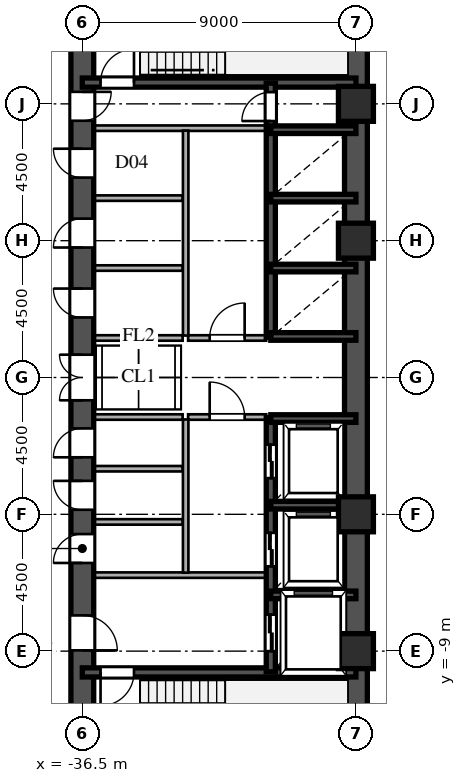
"""IFC4 building model, lengths in metres.
Left out: names, types, materials, properties, quantities, classifications, styles, units other than length and angle.
Written with IfcOpenShell. Run it as: python <this file> out.ifc"""

import sys

from ifc_helpers import new_model, si_unit, direction, frame, frame_2d, origin, origin_2d, place, context, subcontext, project, spatial, rectangle, hollow_rectangle, extrude, source, transform, mapped, element, fill, save


model = new_model("IFC4")
c1 = context("Model", 3, precision=1e-05, world=origin(), true_north=direction((0.0, 1.0)))
c2 = subcontext(c1, "Body", "Model", "MODEL_VIEW")
j1 = project(units=[si_unit("LENGTHUNIT", "METRE"), si_unit("PLANEANGLEUNIT", "RADIAN")], contexts=[c1])
p1 = place(None, origin())
s1 = spatial("IfcSite", under=j1, at=p1, CompositionType="ELEMENT")
p2 = place(p1, origin())
s2 = spatial("IfcBuilding", under=s1, at=p2, CompositionType="ELEMENT")
p3 = place(p2, frame((0.0, 0.0, 58.5)))
s3 = spatial("IfcBuildingStorey", under=s2, at=p3, CompositionType="ELEMENT", Elevation=58.5)
m1 = source(origin(), c2, "Body", "SweptSolid", [
    extrude(hollow_rectangle(XDim=1.15, YDim=1.15, WallThickness=0.048, at=origin_2d()), origin(), (0.0, 0.0, 1.0), 3.6),
])
for number, where, z_axis, x_axis in (
    (1, (-27.5, -9.0, 0.0), (0.0, 0.0, 1.0), (1.0, 0.0, 0.0)),
    (2, (-27.5, -4.5, 0.0), (0.0, 0.0, 1.0), (1.0, 0.0, 0.0)),
    (3, (-27.5, 4.5, 0.0), (0.0, 0.0, 1.0), (1.0, 0.0, 0.0)),
    (4, (-27.5, 9.0, 0.0), (0.0, 0.0, 1.0), (1.0, 0.0, 0.0)),
):
    element("IfcColumn", number, at=place(p3, frame(where, z_axis=z_axis, x_axis=x_axis)), inside=s3, PredefinedType="COLUMN", context=c2, shape_type="MappedRepresentation", body=[
        mapped(m1, transform((0.0, 0.0, 0.0), scale=1.0)),
    ])
for number, where, z_axis, x_axis in (
    (5, (-27.5, -13.5, 0.0), (0.0, 0.0, 1.0), (0.0, 1.0, 0.0)),
    (6, (-27.5, 1.3, 0.0), (0.0, 0.0, 1.0), (0.0, 1.0, 0.0)),
):
    element("IfcWall", number, at=place(p3, frame(where, z_axis=z_axis, x_axis=x_axis)), inside=s3, PredefinedType="SHEAR", context=c2, shape_type="SweptSolid", body=[
        extrude(rectangle(XDim=12.2, YDim=0.75, at=frame_2d((6.1, 0.0))), origin(), (0.0, 0.0, 1.0), 3.38),
    ])
p4 = place(p3, frame((-27.5, -1.3, 0.0), z_axis=(0.0, 0.0, 1.0), x_axis=(0.0, 1.0, 0.0)))
e7 = element("IfcWall", 7, at=p4, inside=s3, PredefinedType="SHEAR", context=c2, shape_type="SweptSolid", body=[
    extrude(rectangle(XDim=2.6, YDim=0.75, at=frame_2d((1.3, 0.0))), origin(), (0.0, 0.0, 1.0), 3.38),
])
p5 = place(p3, frame((-36.5, -13.65, 0.0), z_axis=(0.0, 0.0, 1.0), x_axis=(0.0, 1.0, 0.0)))
e8 = element("IfcWall", 8, at=p5, inside=s3, PredefinedType="SHEAR", context=c2, shape_type="SweptSolid", body=[
    extrude(rectangle(XDim=7.15, YDim=0.75, at=frame_2d((3.575, 0.0))), origin(), (0.0, 0.0, 1.0), 3.38),
])
p6 = place(p5, frame((4.675, 0.0, 0.0)))
e9 = element("IfcOpeningElement", 9, at=p6, cuts=e8, PredefinedType="OPENING", context=c2, shape_type="SweptSolid", body=[
    extrude(rectangle(XDim=1.15, YDim=2.2, at=frame_2d((0.575, 1.1))), frame((0.0, 0.385, 0.0), z_axis=(0.0, -1.0, 0.0), x_axis=(1.0, 0.0, 0.0)), (0.0, 0.0, 1.0), 0.77),
])
p7 = place(p3, frame((-36.5, -1.3, 0.0), z_axis=(0.0, 0.0, 1.0), x_axis=(0.0, 1.0, 0.0)))
e10 = element("IfcWall", 10, at=p7, inside=s3, PredefinedType="SHEAR", context=c2, shape_type="SweptSolid", body=[
    extrude(rectangle(XDim=2.6, YDim=0.75, at=frame_2d((1.3, 0.0))), origin(), (0.0, 0.0, 1.0), 3.38),
])
p8 = place(p7, frame((0.55, 0.0, 0.0)))
e11 = element("IfcOpeningElement", 11, at=p8, cuts=e10, PredefinedType="OPENING", context=c2, shape_type="SweptSolid", body=[
    extrude(rectangle(XDim=1.5, YDim=2.3, at=frame_2d((0.75, 1.15))), frame((0.0, 0.385, 0.0), z_axis=(0.0, -1.0, 0.0), x_axis=(1.0, 0.0, 0.0)), (0.0, 0.0, 1.0), 0.77),
])
p9 = place(p3, frame((-36.5, 8.2, 0.0), z_axis=(0.0, 0.0, 1.0), x_axis=(0.0, 1.0, 0.0)))
e12 = element("IfcWall", 12, at=p9, inside=s3, PredefinedType="SHEAR", context=c2, shape_type="SweptSolid", body=[
    extrude(rectangle(XDim=5.45, YDim=0.75, at=frame_2d((2.725, 0.0))), origin(), (0.0, 0.0, 1.0), 3.38),
])
p10 = place(p9, frame((0.245, 0.0, 0.0)))
e13 = element("IfcOpeningElement", 13, at=p10, cuts=e12, PredefinedType="OPENING", context=c2, shape_type="SweptSolid", body=[
    extrude(rectangle(XDim=0.95, YDim=2.15, at=frame_2d((0.475, 1.075))), frame((0.0, 0.385, 0.0), z_axis=(0.0, -1.0, 0.0), x_axis=(1.0, 0.0, 0.0)), (0.0, 0.0, 1.0), 0.77),
])
p11 = place(p3, frame((-36.5, -6.5, 0.0), z_axis=(0.0, 0.0, 1.0), x_axis=(0.0, 1.0, 0.0)))
e14 = element("IfcWall", 14, at=p11, inside=s3, PredefinedType="SHEAR", context=c2, shape_type="SweptSolid", body=[
    extrude(rectangle(XDim=1.75, YDim=0.75, at=frame_2d((0.875, 0.0))), origin(), (0.0, 0.0, 1.0), 3.38),
])
p12 = place(p11, frame((0.4, 0.0, 0.0)))
e15 = element("IfcOpeningElement", 15, at=p12, cuts=e14, PredefinedType="OPENING", context=c2, shape_type="SweptSolid", body=[
    extrude(rectangle(XDim=0.95, YDim=2.15, at=frame_2d((0.475, 1.075))), frame((0.0, 0.385, 0.0), z_axis=(0.0, -1.0, 0.0), x_axis=(1.0, 0.0, 0.0)), (0.0, 0.0, 1.0), 0.77),
])
p13 = place(p3, frame((-36.5, -4.75, 0.0), z_axis=(0.0, 0.0, 1.0), x_axis=(0.0, 1.0, 0.0)))
e16 = element("IfcWall", 16, at=p13, inside=s3, PredefinedType="SHEAR", context=c2, shape_type="SweptSolid", body=[
    extrude(rectangle(XDim=1.75, YDim=0.75, at=frame_2d((0.875, 0.0))), origin(), (0.0, 0.0, 1.0), 3.38),
])
p14 = place(p13, frame((0.4, 0.0, 0.0)))
e17 = element("IfcOpeningElement", 17, at=p14, cuts=e16, PredefinedType="OPENING", context=c2, shape_type="SweptSolid", body=[
    extrude(rectangle(XDim=0.95, YDim=2.15, at=frame_2d((0.475, 1.075))), frame((0.0, 0.385, 0.0), z_axis=(0.0, -1.0, 0.0), x_axis=(1.0, 0.0, 0.0)), (0.0, 0.0, 1.0), 0.77),
])
p15 = place(p3, frame((-36.5, -3.0, 0.0), z_axis=(0.0, 0.0, 1.0), x_axis=(0.0, 1.0, 0.0)))
e18 = element("IfcWall", 18, at=p15, inside=s3, PredefinedType="SHEAR", context=c2, shape_type="SweptSolid", body=[
    extrude(rectangle(XDim=1.7, YDim=0.75, at=frame_2d((0.85, 0.0))), origin(), (0.0, 0.0, 1.0), 3.38),
])
p16 = place(p15, frame((0.375, 0.0, 0.0)))
e19 = element("IfcOpeningElement", 19, at=p16, cuts=e18, PredefinedType="OPENING", context=c2, shape_type="SweptSolid", body=[
    extrude(rectangle(XDim=0.95, YDim=2.15, at=frame_2d((0.475, 1.075))), frame((0.0, 0.385, 0.0), z_axis=(0.0, -1.0, 0.0), x_axis=(1.0, 0.0, 0.0)), (0.0, 0.0, 1.0), 0.77),
])
p17 = place(p3, frame((-36.5, 1.3, 0.0), z_axis=(0.0, 0.0, 1.0), x_axis=(0.0, 1.0, 0.0)))
e20 = element("IfcWall", 20, at=p17, inside=s3, PredefinedType="SHEAR", context=c2, shape_type="SweptSolid", body=[
    extrude(rectangle(XDim=2.3, YDim=0.75, at=frame_2d((1.15, 0.0))), origin(), (0.0, 0.0, 1.0), 3.38),
])
p18 = place(p17, frame((0.675, 0.0, 0.0)))
e21 = element("IfcOpeningElement", 21, at=p18, cuts=e20, PredefinedType="OPENING", context=c2, shape_type="SweptSolid", body=[
    extrude(rectangle(XDim=0.95, YDim=2.15, at=frame_2d((0.475, 1.075))), frame((0.0, 0.385, 0.0), z_axis=(0.0, -1.0, 0.0), x_axis=(1.0, 0.0, 0.0)), (0.0, 0.0, 1.0), 0.77),
])
p19 = place(p3, frame((-36.5, 3.6, 0.0), z_axis=(0.0, 0.0, 1.0), x_axis=(0.0, 1.0, 0.0)))
e22 = element("IfcWall", 22, at=p19, inside=s3, PredefinedType="SHEAR", context=c2, shape_type="SweptSolid", body=[
    extrude(rectangle(XDim=2.3, YDim=0.75, at=frame_2d((1.15, 0.0))), origin(), (0.0, 0.0, 1.0), 3.38),
])
p20 = place(p19, frame((0.675, 0.0, 0.0)))
e23 = element("IfcOpeningElement", 23, at=p20, cuts=e22, PredefinedType="OPENING", context=c2, shape_type="SweptSolid", body=[
    extrude(rectangle(XDim=0.95, YDim=2.15, at=frame_2d((0.475, 1.075))), frame((0.0, 0.385, 0.0), z_axis=(0.0, -1.0, 0.0), x_axis=(1.0, 0.0, 0.0)), (0.0, 0.0, 1.0), 0.77),
])
p21 = place(p3, frame((-36.5, 5.9, 0.0), z_axis=(0.0, 0.0, 1.0), x_axis=(0.0, 1.0, 0.0)))
e24 = element("IfcWall", 24, at=p21, inside=s3, PredefinedType="SHEAR", context=c2, shape_type="SweptSolid", body=[
    extrude(rectangle(XDim=2.3, YDim=0.75, at=frame_2d((1.15, 0.0))), origin(), (0.0, 0.0, 1.0), 3.38),
])
p22 = place(p21, frame((0.675, 0.0, 0.0)))
e25 = element("IfcOpeningElement", 25, at=p22, cuts=e24, PredefinedType="OPENING", context=c2, shape_type="SweptSolid", body=[
    extrude(rectangle(XDim=0.95, YDim=2.15, at=frame_2d((0.475, 1.075))), frame((0.0, 0.385, 0.0), z_axis=(0.0, -1.0, 0.0), x_axis=(1.0, 0.0, 0.0)), (0.0, 0.0, 1.0), 0.77),
])
p23 = place(p3, frame((-36.5, -9.7, 0.0), z_axis=(0.0, 0.0, 1.0), x_axis=(1.0, 0.0, 0.0)))
e26 = element("IfcWall", 26, at=p23, inside=s3, PredefinedType="SHEAR", context=c2, shape_type="SweptSolid", body=[
    extrude(rectangle(XDim=9.0, YDim=0.3, at=frame_2d((4.5, 0.0))), origin(), (0.0, 0.0, 1.0), 3.38),
])
p24 = place(p23, frame((0.6, 0.0, 0.0)))
e27 = element("IfcOpeningElement", 27, at=p24, cuts=e26, PredefinedType="OPENING", context=c2, shape_type="SweptSolid", body=[
    extrude(rectangle(XDim=1.1, YDim=2.2, at=frame_2d((0.55, 1.1))), frame((0.0, 0.16, 0.0), z_axis=(0.0, -1.0, 0.0), x_axis=(1.0, 0.0, 0.0)), (0.0, 0.0, 1.0), 0.32),
])
p25 = place(p3, frame((-36.5, 9.7, 0.0), z_axis=(0.0, 0.0, 1.0), x_axis=(1.0, 0.0, 0.0)))
e28 = element("IfcWall", 28, at=p25, inside=s3, PredefinedType="SHEAR", context=c2, shape_type="SweptSolid", body=[
    extrude(rectangle(XDim=9.0, YDim=0.3, at=frame_2d((4.5, 0.0))), origin(), (0.0, 0.0, 1.0), 3.38),
])
p26 = place(p25, frame((0.6, 0.0, 0.0)))
e29 = element("IfcOpeningElement", 29, at=p26, cuts=e28, PredefinedType="OPENING", context=c2, shape_type="SweptSolid", body=[
    extrude(rectangle(XDim=1.1, YDim=2.2, at=frame_2d((0.55, 1.1))), frame((0.0, 0.16, 0.0), z_axis=(0.0, -1.0, 0.0), x_axis=(1.0, 0.0, 0.0)), (0.0, 0.0, 1.0), 0.32),
])
for number, where, z_axis, x_axis in (
    (30, (-30.3, -7.15, 0.0), (0.0, 0.0, 1.0), (1.0, 0.0, 0.0)),
    (31, (-30.3, -4.2, 0.0), (0.0, 0.0, 1.0), (1.0, 0.0, 0.0)),
    (32, (-30.3, -1.35, 0.0), (0.0, 0.0, 1.0), (1.0, 0.0, 0.0)),
    (33, (-30.3, 1.35, 0.0), (0.0, 0.0, 1.0), (1.0, 0.0, 0.0)),
    (34, (-30.3, 3.6, 0.0), (0.0, 0.0, 1.0), (1.0, 0.0, 0.0)),
    (35, (-30.3, 5.9, 0.0), (0.0, 0.0, 1.0), (1.0, 0.0, 0.0)),
    (36, (-30.3, 8.15, 0.0), (0.0, 0.0, 1.0), (1.0, 0.0, 0.0)),
):
    element("IfcWall", number, at=place(p3, frame(where, z_axis=z_axis, x_axis=x_axis)), inside=s3, PredefinedType="SHEAR", context=c2, shape_type="SweptSolid", body=[
        extrude(rectangle(XDim=2.8, YDim=0.25, at=frame_2d((1.4, 0.0))), origin(), (0.0, 0.0, 1.0), 3.38),
    ])
p27 = place(p3, frame((-30.3, -9.68, 0.0), z_axis=(0.0, 0.0, 1.0), x_axis=(0.0, 1.0, 0.0)))
e37 = element("IfcWall", 37, at=p27, inside=s3, PredefinedType="SHEAR", context=c2, shape_type="SweptSolid", body=[
    extrude(rectangle(XDim=2.56, YDim=0.3, at=frame_2d((1.28, 0.0))), origin(), (0.0, 0.0, 1.0), 3.38),
])
p28 = place(p27, frame((0.68, 0.0, 0.0)))
e38 = element("IfcOpeningElement", 38, at=p28, cuts=e37, PredefinedType="OPENING", context=c2, shape_type="SweptSolid", body=[
    extrude(rectangle(XDim=1.2, YDim=2.25, at=frame_2d((0.6, 1.125))), frame((0.0, 0.16, 0.0), z_axis=(0.0, -1.0, 0.0), x_axis=(1.0, 0.0, 0.0)), (0.0, 0.0, 1.0), 0.32),
])
p29 = place(p3, frame((-30.3, -7.12, 0.0), z_axis=(0.0, 0.0, 1.0), x_axis=(0.0, 1.0, 0.0)))
e39 = element("IfcWall", 39, at=p29, inside=s3, PredefinedType="SHEAR", context=c2, shape_type="SweptSolid", body=[
    extrude(rectangle(XDim=2.92, YDim=0.3, at=frame_2d((1.46, 0.0))), origin(), (0.0, 0.0, 1.0), 3.38),
])
p30 = place(p29, frame((0.91, 0.0, 0.0)))
e40 = element("IfcOpeningElement", 40, at=p30, cuts=e39, PredefinedType="OPENING", context=c2, shape_type="SweptSolid", body=[
    extrude(rectangle(XDim=1.1, YDim=2.2, at=frame_2d((0.55, 1.1))), frame((0.0, 0.16, 0.0), z_axis=(0.0, -1.0, 0.0), x_axis=(1.0, 0.0, 0.0)), (0.0, 0.0, 1.0), 0.32),
])
p31 = place(p3, frame((-30.3, -4.2, 0.0), z_axis=(0.0, 0.0, 1.0), x_axis=(0.0, 1.0, 0.0)))
e41 = element("IfcWall", 41, at=p31, inside=s3, PredefinedType="SHEAR", context=c2, shape_type="SweptSolid", body=[
    extrude(rectangle(XDim=2.88, YDim=0.3, at=frame_2d((1.44, 0.0))), origin(), (0.0, 0.0, 1.0), 3.38),
])
p32 = place(p31, frame((0.89, 0.0, 0.0)))
e42 = element("IfcOpeningElement", 42, at=p32, cuts=e41, PredefinedType="OPENING", context=c2, shape_type="SweptSolid", body=[
    extrude(rectangle(XDim=1.1, YDim=2.2, at=frame_2d((0.55, 1.1))), frame((0.0, 0.16, 0.0), z_axis=(0.0, -1.0, 0.0), x_axis=(1.0, 0.0, 0.0)), (0.0, 0.0, 1.0), 0.32),
])
p33 = place(p3, frame((-30.3, 1.32, 0.0), z_axis=(0.0, 0.0, 1.0), x_axis=(0.0, 1.0, 0.0)))
e43 = element("IfcWall", 43, at=p33, inside=s3, PredefinedType="SHEAR", context=c2, shape_type="SweptSolid", body=[
    extrude(rectangle(XDim=2.28, YDim=0.3, at=frame_2d((1.14, 0.0))), origin(), (0.0, 0.0, 1.0), 3.38),
])
p34 = place(p3, frame((-30.3, 3.6, 0.0), z_axis=(0.0, 0.0, 1.0), x_axis=(0.0, 1.0, 0.0)))
e44 = element("IfcWall", 44, at=p34, inside=s3, PredefinedType="SHEAR", context=c2, shape_type="SweptSolid", body=[
    extrude(rectangle(XDim=2.3, YDim=0.3, at=frame_2d((1.15, 0.0))), origin(), (0.0, 0.0, 1.0), 3.38),
])
p35 = place(p3, frame((-30.3, 5.9, 0.0), z_axis=(0.0, 0.0, 1.0), x_axis=(0.0, 1.0, 0.0)))
e45 = element("IfcWall", 45, at=p35, inside=s3, PredefinedType="SHEAR", context=c2, shape_type="SweptSolid", body=[
    extrude(rectangle(XDim=2.25, YDim=0.3, at=frame_2d((1.125, 0.0))), origin(), (0.0, 0.0, 1.0), 3.38),
])
p36 = place(p3, frame((-30.3, 8.15, 0.0), z_axis=(0.0, 0.0, 1.0), x_axis=(0.0, 1.0, 0.0)))
e46 = element("IfcWall", 46, at=p36, inside=s3, PredefinedType="SHEAR", context=c2, shape_type="SweptSolid", body=[
    extrude(rectangle(XDim=1.53, YDim=0.3, at=frame_2d((0.765, 0.0))), origin(), (0.0, 0.0, 1.0), 3.38),
])
p37 = place(p36, frame((0.285, 0.0, 0.0)))
e47 = element("IfcOpeningElement", 47, at=p37, cuts=e46, PredefinedType="OPENING", context=c2, shape_type="SweptSolid", body=[
    extrude(rectangle(XDim=0.95, YDim=2.15, at=frame_2d((0.475, 1.075))), frame((0.0, 0.16, 0.0), z_axis=(0.0, -1.0, 0.0), x_axis=(1.0, 0.0, 0.0)), (0.0, 0.0, 1.0), 0.32),
])
for number, where, z_axis, x_axis in (
    (48, (-36.15, -6.5, 0.0), (0.0, 0.0, 1.0), (1.0, 0.0, 0.0)),
    (49, (-36.15, 8.2, 0.0), (0.0, 0.0, 1.0), (1.0, 0.0, 0.0)),
):
    element("IfcWall", number, at=place(p3, frame(where, z_axis=z_axis, x_axis=x_axis)), inside=s3, PredefinedType="PARTITIONING", context=c2, shape_type="SweptSolid", body=[
        extrude(rectangle(XDim=5.7, YDim=0.18, at=frame_2d((2.85, 0.0))), origin(), (0.0, 0.0, 1.0), 3.38),
    ])
p38 = place(p3, frame((-33.1, -6.42, 0.0), z_axis=(0.0, 0.0, 1.0), x_axis=(0.0, 1.0, 0.0)))
e50 = element("IfcWall", 50, at=p38, inside=s3, PredefinedType="PARTITIONING", context=c2, shape_type="SweptSolid", body=[
    extrude(rectangle(XDim=5.04, YDim=0.18, at=frame_2d((2.52, 0.0))), origin(), (0.0, 0.0, 1.0), 3.38),
])
p39 = place(p3, frame((-33.1, 1.38, 0.0), z_axis=(0.0, 0.0, 1.0), x_axis=(0.0, 1.0, 0.0)))
e51 = element("IfcWall", 51, at=p39, inside=s3, PredefinedType="PARTITIONING", context=c2, shape_type="SweptSolid", body=[
    extrude(rectangle(XDim=6.74, YDim=0.18, at=frame_2d((3.37, 0.0))), origin(), (0.0, 0.0, 1.0), 3.38),
])
p40 = place(p3, frame((-33.02, -1.3, 0.0), z_axis=(0.0, 0.0, 1.0), x_axis=(1.0, 0.0, 0.0)))
e52 = element("IfcWall", 52, at=p40, inside=s3, PredefinedType="PARTITIONING", context=c2, shape_type="SweptSolid", body=[
    extrude(rectangle(XDim=2.57, YDim=0.18, at=frame_2d((1.285, 0.0))), origin(), (0.0, 0.0, 1.0), 3.38),
])
p41 = place(p40, frame((0.71, 0.0, 0.0)))
e53 = element("IfcOpeningElement", 53, at=p41, cuts=e52, PredefinedType="OPENING", context=c2, shape_type="SweptSolid", body=[
    extrude(rectangle(XDim=1.15, YDim=2.2, at=frame_2d((0.575, 1.1))), frame((0.0, 0.1, 0.0), z_axis=(0.0, -1.0, 0.0), x_axis=(1.0, 0.0, 0.0)), (0.0, 0.0, 1.0), 0.2),
])
p42 = place(p3, frame((-33.02, 1.3, 0.0), z_axis=(0.0, 0.0, 1.0), x_axis=(1.0, 0.0, 0.0)))
e54 = element("IfcWall", 54, at=p42, inside=s3, PredefinedType="PARTITIONING", context=c2, shape_type="SweptSolid", body=[
    extrude(rectangle(XDim=2.57, YDim=0.18, at=frame_2d((1.285, 0.0))), origin(), (0.0, 0.0, 1.0), 3.38),
])
p43 = place(p42, frame((0.71, 0.0, 0.0)))
e55 = element("IfcOpeningElement", 55, at=p43, cuts=e54, PredefinedType="OPENING", context=c2, shape_type="SweptSolid", body=[
    extrude(rectangle(XDim=1.15, YDim=2.2, at=frame_2d((0.575, 1.1))), frame((0.0, 0.1, 0.0), z_axis=(0.0, -1.0, 0.0), x_axis=(1.0, 0.0, 0.0)), (0.0, 0.0, 1.0), 0.2),
])
for number, where, z_axis, x_axis in (
    (56, (-36.15, -1.3, 0.0), (0.0, 0.0, 1.0), (1.0, 0.0, 0.0)),
    (57, (-36.15, 1.3, 0.0), (0.0, 0.0, 1.0), (1.0, 0.0, 0.0)),
    (58, (-36.15, -4.75, 0.0), (0.0, 0.0, 1.0), (1.0, 0.0, 0.0)),
    (59, (-36.15, -3.0, 0.0), (0.0, 0.0, 1.0), (1.0, 0.0, 0.0)),
    (60, (-36.15, 3.6, 0.0), (0.0, 0.0, 1.0), (1.0, 0.0, 0.0)),
    (61, (-36.15, 5.9, 0.0), (0.0, 0.0, 1.0), (1.0, 0.0, 0.0)),
):
    element("IfcWall", number, at=place(p3, frame(where, z_axis=z_axis, x_axis=x_axis)), inside=s3, PredefinedType="PARTITIONING", context=c2, shape_type="SweptSolid", body=[
        extrude(rectangle(XDim=2.95, YDim=0.18, at=frame_2d((1.475, 0.0))), origin(), (0.0, 0.0, 1.0), 3.38),
    ])
m2 = source(origin(), c2, "Body", "SweptSolid", [
    extrude(rectangle(XDim=1.15, YDim=2.2, at=frame_2d((0.575, 1.1))), frame((0.0, 0.025, 0.0), z_axis=(0.0, -1.0, 0.0), x_axis=(1.0, 0.0, 0.0)), (0.0, 0.0, 1.0), 0.05),
])
p44 = place(p6, frame((1.15, 0.0, 0.0), z_axis=(0.0, 0.0, 1.0), x_axis=(-1.0, 0.0, 0.0)))
e62 = element("IfcDoor", 62, at=p44, inside=s3, OperationType="SINGLE_SWING_LEFT", PredefinedType="DOOR", context=c2, shape_type="MappedRepresentation", body=[
    mapped(m2, transform((0.0, 0.0, 0.0), scale=1.0)),
])
fill(e9, e62)
m3 = source(origin(), c2, "Body", "SweptSolid", [
    extrude(rectangle(XDim=1.5, YDim=2.3, at=frame_2d((0.75, 1.15))), frame((0.0, 0.025, 0.0), z_axis=(0.0, -1.0, 0.0), x_axis=(1.0, 0.0, 0.0)), (0.0, 0.0, 1.0), 0.05),
])
p45 = place(p8, origin())
e63 = element("IfcDoor", 63, at=p45, inside=s3, OperationType="DOUBLE_SWING_LEFT", PredefinedType="DOOR", context=c2, shape_type="MappedRepresentation", body=[
    mapped(m3, transform((0.0, 0.0, 0.0), scale=1.0)),
])
fill(e11, e63)
m4 = source(origin(), c2, "Body", "SweptSolid", [
    extrude(rectangle(XDim=0.95, YDim=2.15, at=frame_2d((0.475, 1.075))), frame((0.0, 0.025, 0.0), z_axis=(0.0, -1.0, 0.0), x_axis=(1.0, 0.0, 0.0)), (0.0, 0.0, 1.0), 0.05),
])
p46 = place(p10, frame((0.95, 0.0, 0.0), z_axis=(0.0, 0.0, 1.0), x_axis=(-1.0, 0.0, 0.0)))
e64 = element("IfcDoor", 64, at=p46, inside=s3, OperationType="SINGLE_SWING_RIGHT", PredefinedType="DOOR", context=c2, shape_type="MappedRepresentation", body=[
    mapped(m4, transform((0.0, 0.0, 0.0), scale=1.0)),
])
fill(e13, e64)
p47 = place(p12, origin())
e65 = element("IfcDoor", 65, at=p47, inside=s3, OperationType="SINGLE_SWING_LEFT", PredefinedType="DOOR", context=c2, shape_type="MappedRepresentation", body=[
    mapped(m4, transform((0.0, 0.0, 0.0), scale=1.0)),
])
fill(e15, e65)
p48 = place(p14, origin())
e66 = element("IfcDoor", 66, at=p48, inside=s3, OperationType="SINGLE_SWING_RIGHT", PredefinedType="DOOR", context=c2, shape_type="MappedRepresentation", body=[
    mapped(m4, transform((0.0, 0.0, 0.0), scale=1.0)),
])
fill(e17, e66)
p49 = place(p16, origin())
e67 = element("IfcDoor", 67, at=p49, inside=s3, OperationType="SINGLE_SWING_LEFT", PredefinedType="DOOR", context=c2, shape_type="MappedRepresentation", body=[
    mapped(m4, transform((0.0, 0.0, 0.0), scale=1.0)),
])
fill(e19, e67)
p50 = place(p18, origin())
e68 = element("IfcDoor", 68, at=p50, inside=s3, OperationType="SINGLE_SWING_RIGHT", PredefinedType="DOOR", context=c2, shape_type="MappedRepresentation", body=[
    mapped(m4, transform((0.0, 0.0, 0.0), scale=1.0)),
])
fill(e21, e68)
p51 = place(p20, origin())
e69 = element("IfcDoor", 69, at=p51, inside=s3, OperationType="SINGLE_SWING_LEFT", PredefinedType="DOOR", context=c2, shape_type="MappedRepresentation", body=[
    mapped(m4, transform((0.0, 0.0, 0.0), scale=1.0)),
])
fill(e23, e69)
p52 = place(p22, origin())
e70 = element("IfcDoor", 70, at=p52, inside=s3, OperationType="SINGLE_SWING_RIGHT", PredefinedType="DOOR", context=c2, shape_type="MappedRepresentation", body=[
    mapped(m4, transform((0.0, 0.0, 0.0), scale=1.0)),
])
fill(e25, e70)
m5 = source(origin(), c2, "Body", "SweptSolid", [
    extrude(rectangle(XDim=1.1, YDim=2.2, at=frame_2d((0.55, 1.1))), frame((0.0, 0.025, 0.0), z_axis=(0.0, -1.0, 0.0), x_axis=(1.0, 0.0, 0.0)), (0.0, 0.0, 1.0), 0.05),
])
p53 = place(p24, frame((1.1, 0.0, 0.0), z_axis=(0.0, 0.0, 1.0), x_axis=(-1.0, 0.0, 0.0)))
e71 = element("IfcDoor", 71, at=p53, inside=s3, OperationType="SINGLE_SWING_LEFT", PredefinedType="DOOR", context=c2, shape_type="MappedRepresentation", body=[
    mapped(m5, transform((0.0, 0.0, 0.0), scale=1.0)),
])
fill(e27, e71)
p54 = place(p26, origin())
e72 = element("IfcDoor", 72, at=p54, inside=s3, OperationType="SINGLE_SWING_RIGHT", PredefinedType="DOOR", context=c2, shape_type="MappedRepresentation", body=[
    mapped(m5, transform((0.0, 0.0, 0.0), scale=1.0)),
])
fill(e29, e72)
m6 = source(origin(), c2, "Body", "SweptSolid", [
    extrude(rectangle(XDim=1.2, YDim=2.25, at=frame_2d((0.6, 1.125))), frame((0.0, 0.025, 0.0), z_axis=(0.0, -1.0, 0.0), x_axis=(1.0, 0.0, 0.0)), (0.0, 0.0, 1.0), 0.05),
])
p55 = place(p28, origin())
e73 = element("IfcDoor", 73, at=p55, inside=s3, OperationType="DOUBLE_DOOR_SLIDING", PredefinedType="DOOR", context=c2, shape_type="MappedRepresentation", body=[
    mapped(m6, transform((0.0, 0.0, 0.0), scale=1.0)),
])
fill(e38, e73)
m7 = source(origin(), c2, "Body", "SweptSolid", [
    extrude(rectangle(XDim=1.1, YDim=2.2, at=frame_2d((0.55, 1.1))), frame((0.0, 0.025, 0.0), z_axis=(0.0, -1.0, 0.0), x_axis=(1.0, 0.0, 0.0)), (0.0, 0.0, 1.0), 0.05),
])
p56 = place(p30, origin())
e74 = element("IfcDoor", 74, at=p56, inside=s3, OperationType="DOUBLE_DOOR_SLIDING", PredefinedType="DOOR", context=c2, shape_type="MappedRepresentation", body=[
    mapped(m7, transform((0.0, 0.0, 0.0), scale=1.0)),
])
fill(e40, e74)
p57 = place(p32, origin())
e75 = element("IfcDoor", 75, at=p57, inside=s3, OperationType="DOUBLE_DOOR_SLIDING", PredefinedType="DOOR", context=c2, shape_type="MappedRepresentation", body=[
    mapped(m7, transform((0.0, 0.0, 0.0), scale=1.0)),
])
fill(e42, e75)
p58 = place(p37, origin())
e76 = element("IfcDoor", 76, at=p58, inside=s3, OperationType="SINGLE_SWING_LEFT", PredefinedType="DOOR", context=c2, shape_type="MappedRepresentation", body=[
    mapped(m4, transform((0.0, 0.0, 0.0), scale=1.0)),
])
fill(e47, e76)
p59 = place(p41, origin())
e77 = element("IfcDoor", 77, at=p59, inside=s3, OperationType="SINGLE_SWING_LEFT", PredefinedType="DOOR", context=c2, shape_type="MappedRepresentation", body=[
    mapped(m2, transform((0.0, 0.0, 0.0), scale=1.0)),
])
fill(e53, e77)
p60 = place(p43, origin())
e78 = element("IfcDoor", 78, at=p60, inside=s3, OperationType="SINGLE_SWING_RIGHT", PredefinedType="DOOR", context=c2, shape_type="MappedRepresentation", body=[
    mapped(m2, transform((0.0, 0.0, 0.0), scale=1.0)),
])
fill(e55, e78)
save(model, sys.argv[1])
